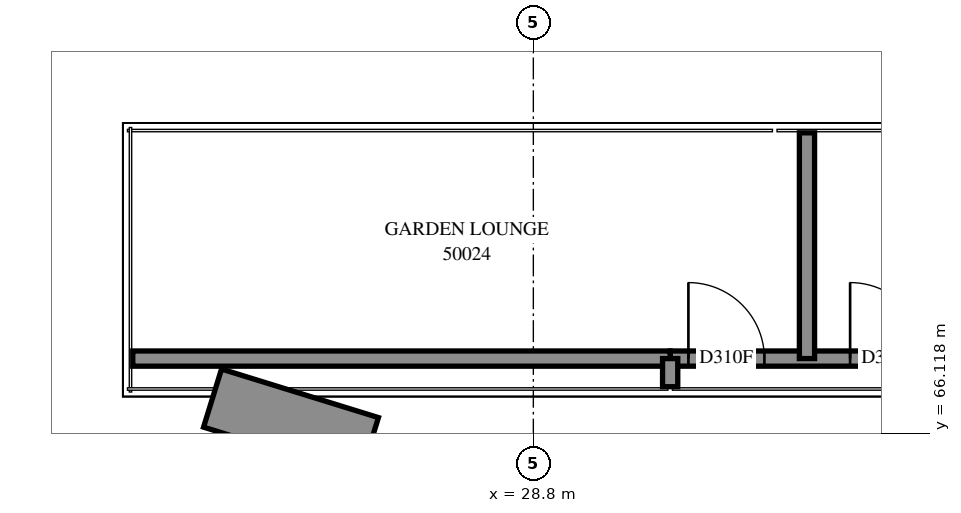
"""IFC4 building model, lengths in metres.
Left out: names, types, materials, properties, quantities, classifications, styles, units other than length and angle.
Written with IfcOpenShell. Run it as: python <this file> out.ifc"""

import sys

from ifc_helpers import new_model, si_unit, direction, frame, frame_2d, origin, place, context, subcontext, project, spatial, rectangle, extrude, element, fill, save


model = new_model("IFC4")
c1 = context("Model", 3, precision=1e-05, world=origin(), true_north=direction((0.0, 1.0)))
c2 = subcontext(c1, "Body", "Model", "MODEL_VIEW")
j1 = project(units=[si_unit("LENGTHUNIT", "METRE"), si_unit("PLANEANGLEUNIT", "RADIAN")], contexts=[c1])
p1 = place(None, origin())
s1 = spatial("IfcSite", under=j1, at=p1, CompositionType="ELEMENT")
p2 = place(p1, origin())
s2 = spatial("IfcBuilding", under=s1, at=p2, CompositionType="ELEMENT")
p3 = place(p2, frame((0.0, 0.0, 185.4)))
s3 = spatial("IfcBuildingStorey", under=s2, at=p3, CompositionType="ELEMENT", Elevation=185.4)
p4 = place(p3, frame((26.644, 65.942, 0.0), z_axis=(0.0, 0.0, 1.0), x_axis=(-0.9553618, 0.295438371, 0.0)))
e1 = element("IfcWall", 1, at=p4, inside=s3, PredefinedType="SOLIDWALL", context=c2, shape_type="SweptSolid", body=[
    extrude(rectangle(XDim=2.161, YDim=0.8, at=frame_2d((1.08, 0.0))), origin(), (0.0, 0.0, 1.0), 0.65),
])
p5 = place(p3, frame((30.6, 67.1, 0.0), z_axis=(0.0, 0.0, 1.0), x_axis=(1.0, 0.0, 0.0)))
e2 = element("IfcWall", 2, at=p5, inside=s3, PredefinedType="PARTITIONING", context=c2, shape_type="SweptSolid", body=[
    extrude(rectangle(XDim=10.1, YDim=0.2, at=frame_2d((5.05, 0.0))), origin(), (0.0, 0.0, 1.0), 3.9),
])
p6 = place(p5, frame((0.24, 0.0, 0.0)))
e3 = element("IfcOpeningElement", 3, at=p6, cuts=e2, PredefinedType="OPENING", context=c2, shape_type="SweptSolid", body=[
    extrude(rectangle(XDim=1.0, YDim=2.1, at=frame_2d((0.5, 1.05))), frame((0.0, 0.11, 0.0), z_axis=(0.0, -1.0, 0.0), x_axis=(1.0, 0.0, 0.0)), (0.0, 0.0, 1.0), 0.22),
])
p7 = place(p5, frame((2.368, 0.0, 0.0)))
e4 = element("IfcOpeningElement", 4, at=p7, cuts=e2, PredefinedType="OPENING", context=c2, shape_type="SweptSolid", body=[
    extrude(rectangle(XDim=1.0, YDim=2.1, at=frame_2d((0.5, 1.05))), frame((0.0, 0.11, 0.0), z_axis=(0.0, -1.0, 0.0), x_axis=(1.0, 0.0, 0.0)), (0.0, 0.0, 1.0), 0.22),
])
p8 = place(p5, frame((7.492, 0.0, 0.0)))
e5 = element("IfcOpeningElement", 5, at=p8, cuts=e2, PredefinedType="OPENING", context=c2, shape_type="SweptSolid", body=[
    extrude(rectangle(XDim=1.0, YDim=2.1, at=frame_2d((0.5, 1.05))), frame((0.0, 0.11, 0.0), z_axis=(0.0, -1.0, 0.0), x_axis=(1.0, 0.0, 0.0)), (0.0, 0.0, 1.0), 0.22),
])
p9 = place(p3, frame((23.53, 67.1, 0.0), z_axis=(0.0, 0.0, 1.0), x_axis=(1.0, 0.0, 0.0)))
e6 = element("IfcWall", 6, at=p9, inside=s3, PredefinedType="PARTITIONING", context=c2, shape_type="SweptSolid", body=[
    extrude(rectangle(XDim=7.07, YDim=0.2, at=frame_2d((3.535, 0.0))), origin(), (0.0, 0.0, 1.0), 3.9),
])
p10 = place(p3, frame((32.4, 67.1, 0.0), z_axis=(0.0, 0.0, 1.0), x_axis=(0.0, 1.0, 0.0)))
e7 = element("IfcWall", 7, at=p10, inside=s3, PredefinedType="PARTITIONING", context=c2, shape_type="SweptSolid", body=[
    extrude(rectangle(XDim=2.97, YDim=0.2, at=frame_2d((1.485, 0.0))), origin(), (0.0, 0.0, 1.0), 3.9),
])
p11 = place(p3, frame((30.6, 66.73, 0.0), z_axis=(0.0, 0.0, 1.0), x_axis=(0.0, 1.0, 0.0)))
e8 = element("IfcWall", 8, at=p11, inside=s3, PredefinedType="PARTITIONING", context=c2, shape_type="SweptSolid", body=[
    extrude(rectangle(XDim=0.37, YDim=0.2, at=frame_2d((0.185, 0.0))), origin(), (0.0, 0.0, 1.0), 3.9),
])
p12 = place(p6, origin())
e9 = element("IfcDoor", 9, at=p12, inside=s3, OperationType="SINGLE_SWING_LEFT", PredefinedType="DOOR", context=c2, shape_type="SweptSolid", body=[
    extrude(rectangle(XDim=1.0, YDim=2.1, at=frame_2d((0.5, 1.05))), frame((0.0, 0.025, 0.0), z_axis=(0.0, -1.0, 0.0), x_axis=(1.0, 0.0, 0.0)), (0.0, 0.0, 1.0), 0.05),
])
fill(e3, e9)
p13 = place(p7, origin())
e10 = element("IfcDoor", 10, at=p13, inside=s3, OperationType="SINGLE_SWING_LEFT", PredefinedType="DOOR", context=c2, shape_type="SweptSolid", body=[
    extrude(rectangle(XDim=1.0, YDim=2.1, at=frame_2d((0.5, 1.05))), frame((0.0, 0.025, 0.0), z_axis=(0.0, -1.0, 0.0), x_axis=(1.0, 0.0, 0.0)), (0.0, 0.0, 1.0), 0.05),
])
fill(e4, e10)
save(model, sys.argv[1])
